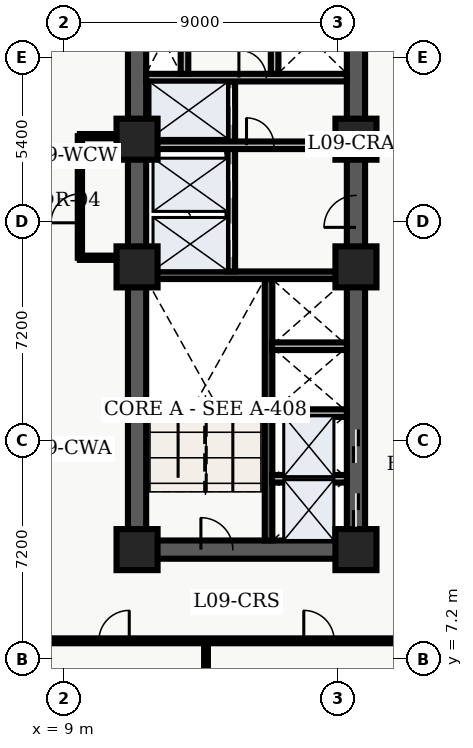
"""IFC4 building model, lengths in metres.
Left out: names, types, materials, properties, quantities, classifications, styles, units other than length and angle.
Written with IfcOpenShell. Run it as: python <this file> out.ifc"""

import sys

from ifc_helpers import new_model, entity, si_unit, converted_unit, direction, frame, origin_with_axes, origin_2d_with_axis, place, context, subcontext, project, spatial, polyline, rectangle, outline, extrude, element, fill, save


model = new_model("IFC4")
c1 = context("Model", 3, precision=1e-05, world=origin_with_axes(), true_north=direction((0.0, 1.0)))
c2 = subcontext(c1, "Body", "Model", "MODEL_VIEW")
j1 = project(units=[si_unit("LENGTHUNIT", "METRE"), converted_unit("PLANEANGLEUNIT", "DEGREE", entity("IfcPlaneAngleMeasure", 0.017), si_unit("PLANEANGLEUNIT", "RADIAN"), dimensions=[0, 0, 0, 0, 0, 0, 0])], contexts=[c1])
p1 = place(None, origin_with_axes())
s1 = spatial("IfcSite", under=j1, at=p1, CompositionType="ELEMENT")
p2 = place(p1, origin_with_axes())
s2 = spatial("IfcBuilding", under=s1, at=p2, CompositionType="ELEMENT")
p3 = place(p2, frame((0.0, 0.0, 40.5), z_axis=(0.0, 0.0, 1.0), x_axis=(1.0, 0.0, 0.0)))
s3 = spatial("IfcBuildingStorey", under=s2, at=p3, CompositionType="ELEMENT", Elevation=40.5)
p4 = place(p3, frame((11.4, 10.8, 0.0), z_axis=(0.0, 0.0, 1.0), x_axis=(0.0, 1.0, 0.0)))
e1 = element("IfcWall", 1, at=p4, inside=s3, PredefinedType="SHEAR", context=c2, shape_type="SweptSolid", body=[
    extrude(outline(polyline([(0.0, -0.3), (27.0, -0.3), (27.0, 0.3), (0.0, 0.3), (0.0, -0.3)])), origin_with_axes(), (0.0, 0.0, 1.0), 3.66),
])
p5 = place(p3, frame((11.4, 10.8, 0.0), z_axis=(0.0, 0.0, 1.0), x_axis=(1.0, 0.0, 0.0)))
e2 = element("IfcWall", 2, at=p5, inside=s3, PredefinedType="SHEAR", context=c2, shape_type="SweptSolid", body=[
    extrude(outline(polyline([(0.0, -0.3), (7.2, -0.3), (7.2, 0.3), (0.0, 0.3), (0.0, -0.3)])), origin_with_axes(), (0.0, 0.0, 1.0), 3.66),
])
p6 = place(p5, frame((2.625, 0.0, 0.0), z_axis=(0.0, 0.0, 1.0), x_axis=(1.0, 0.0, 0.0)))
e3 = element("IfcOpeningElement", 3, at=p6, cuts=e2, PredefinedType="OPENING", context=c2, shape_type="SweptSolid", body=[
    extrude(rectangle(XDim=1.05, YDim=0.62, at=origin_2d_with_axis()), origin_with_axes(), (0.0, 0.0, 1.0), 2.15),
])
p7 = place(p3, frame((18.6, 10.8, 0.0), z_axis=(0.0, 0.0, 1.0), x_axis=(0.0, 1.0, 0.0)))
e4 = element("IfcWall", 4, at=p7, inside=s3, PredefinedType="SHEAR", context=c2, shape_type="SweptSolid", body=[
    extrude(outline(polyline([(0.0, -0.3), (13.5, -0.3), (13.5, 0.3), (0.0, 0.3), (0.0, -0.3)])), origin_with_axes(), (0.0, 0.0, 1.0), 3.66),
])
p8 = place(p7, frame((1.3, 0.0, 0.0), z_axis=(0.0, 0.0, 1.0), x_axis=(1.0, 0.0, 0.0)))
e5 = element("IfcOpeningElement", 5, at=p8, cuts=e4, PredefinedType="OPENING", context=c2, shape_type="SweptSolid", body=[
    extrude(rectangle(XDim=1.1, YDim=0.62, at=origin_2d_with_axis()), origin_with_axes(), (0.0, 0.0, 1.0), 2.15),
])
p9 = place(p7, frame((3.4, 0.0, 0.0), z_axis=(0.0, 0.0, 1.0), x_axis=(1.0, 0.0, 0.0)))
e6 = element("IfcOpeningElement", 6, at=p9, cuts=e4, PredefinedType="OPENING", context=c2, shape_type="SweptSolid", body=[
    extrude(rectangle(XDim=1.1, YDim=0.62, at=origin_2d_with_axis()), origin_with_axes(), (0.0, 0.0, 1.0), 2.15),
])
p10 = place(p7, frame((11.125, 0.0, 0.0), z_axis=(0.0, 0.0, 1.0), x_axis=(1.0, 0.0, 0.0)))
e7 = element("IfcOpeningElement", 7, at=p10, cuts=e4, PredefinedType="OPENING", context=c2, shape_type="SweptSolid", body=[
    extrude(rectangle(XDim=1.05, YDim=0.62, at=origin_2d_with_axis()), origin_with_axes(), (0.0, 0.0, 1.0), 2.15),
])
p11 = place(p3, frame((18.6, 24.3, 0.0), z_axis=(0.0, 0.0, 1.0), x_axis=(0.0, 1.0, 0.0)))
e8 = element("IfcWall", 8, at=p11, inside=s3, PredefinedType="SHEAR", context=c2, shape_type="SweptSolid", body=[
    extrude(outline(polyline([(0.0, -0.3), (13.5, -0.3), (13.5, 0.3), (0.0, 0.3), (0.0, -0.3)])), origin_with_axes(), (0.0, 0.0, 1.0), 3.66),
])
p12 = place(p11, frame((6.725, 0.0, 0.0), z_axis=(0.0, 0.0, 1.0), x_axis=(1.0, 0.0, 0.0)))
e9 = element("IfcOpeningElement", 9, at=p12, cuts=e8, PredefinedType="OPENING", context=c2, shape_type="SweptSolid", body=[
    extrude(rectangle(XDim=1.05, YDim=0.62, at=origin_2d_with_axis()), origin_with_axes(), (0.0, 0.0, 1.0), 2.15),
])
p13 = place(p3, frame((15.725, 11.1, 0.0), z_axis=(0.0, 0.0, 1.0), x_axis=(0.0, 1.0, 0.0)))
e10 = element("IfcWall", 10, at=p13, inside=s3, PredefinedType="SHEAR", context=c2, shape_type="SweptSolid", body=[
    extrude(outline(polyline([(0.0, -0.125), (8.6, -0.125), (8.6, 0.125), (0.0, 0.125), (0.0, -0.125)])), origin_with_axes(), (0.0, 0.0, 1.0), 3.66),
])
p14 = place(p3, frame((11.7, 19.825, 0.0), z_axis=(0.0, 0.0, 1.0), x_axis=(1.0, 0.0, 0.0)))
e11 = element("IfcWall", 11, at=p14, inside=s3, PredefinedType="SHEAR", context=c2, shape_type="SweptSolid", body=[
    extrude(outline(polyline([(0.0, -0.125), (6.6, -0.125), (6.6, 0.125), (0.0, 0.125), (0.0, -0.125)])), origin_with_axes(), (0.0, 0.0, 1.0), 3.66),
])
p15 = place(p3, frame((14.5, 19.95, 0.0), z_axis=(0.0, 0.0, 1.0), x_axis=(0.0, 1.0, 0.0)))
e12 = element("IfcWall", 12, at=p15, inside=s3, PredefinedType="SOLIDWALL", context=c2, shape_type="SweptSolid", body=[
    extrude(outline(polyline([(0.0, -0.125), (6.25, -0.125), (6.25, 0.125), (0.0, 0.125), (0.0, -0.125)])), origin_with_axes(), (0.0, 0.0, 1.0), 2.7),
])
p16 = place(p15, frame((1.025, 0.0, 0.0), z_axis=(0.0, 0.0, 1.0), x_axis=(1.0, 0.0, 0.0)))
e13 = element("IfcOpeningElement", 13, at=p16, cuts=e12, PredefinedType="OPENING", context=c2, shape_type="SweptSolid", body=[
    extrude(rectangle(XDim=1.1, YDim=0.27, at=origin_2d_with_axis()), origin_with_axes(), (0.0, 0.0, 1.0), 2.15),
])
p17 = place(p15, frame((2.975, 0.0, 0.0), z_axis=(0.0, 0.0, 1.0), x_axis=(1.0, 0.0, 0.0)))
e14 = element("IfcOpeningElement", 14, at=p17, cuts=e12, PredefinedType="OPENING", context=c2, shape_type="SweptSolid", body=[
    extrude(rectangle(XDim=1.1, YDim=0.27, at=origin_2d_with_axis()), origin_with_axes(), (0.0, 0.0, 1.0), 2.15),
])
p18 = place(p15, frame((5.425, 0.0, 0.0), z_axis=(0.0, 0.0, 1.0), x_axis=(1.0, 0.0, 0.0)))
e15 = element("IfcOpeningElement", 15, at=p18, cuts=e12, PredefinedType="OPENING", context=c2, shape_type="SweptSolid", body=[
    extrude(rectangle(XDim=1.2, YDim=0.27, at=origin_2d_with_axis()), origin_with_axes(), (0.0, 0.0, 1.0), 2.15),
])
p19 = place(p3, frame((11.7, 24.1, 0.0), z_axis=(0.0, 0.0, 1.0), x_axis=(1.0, 0.0, 0.0)))
e16 = element("IfcWall", 16, at=p19, inside=s3, PredefinedType="SOLIDWALL", context=c2, shape_type="SweptSolid", body=[
    extrude(outline(polyline([(0.0, -0.125), (6.6, -0.125), (6.6, 0.125), (0.0, 0.125), (0.0, -0.125)])), origin_with_axes(), (0.0, 0.0, 1.0), 2.7),
])
p20 = place(p19, frame((3.75, 0.0, 0.0), z_axis=(0.0, 0.0, 1.0), x_axis=(1.0, 0.0, 0.0)))
e17 = element("IfcOpeningElement", 17, at=p20, cuts=e16, PredefinedType="OPENING", context=c2, shape_type="SweptSolid", body=[
    extrude(rectangle(XDim=0.9, YDim=0.27, at=origin_2d_with_axis()), origin_with_axes(), (0.0, 0.0, 1.0), 2.15),
])
p21 = place(p3, frame((11.7, 26.325, 0.0), z_axis=(0.0, 0.0, 1.0), x_axis=(1.0, 0.0, 0.0)))
e18 = element("IfcWall", 18, at=p21, inside=s3, PredefinedType="SOLIDWALL", context=c2, shape_type="SweptSolid", body=[
    extrude(outline(polyline([(0.0, -0.125), (6.6, -0.125), (6.6, 0.125), (0.0, 0.125), (0.0, -0.125)])), origin_with_axes(), (0.0, 0.0, 1.0), 2.7),
])
p22 = place(p21, frame((3.5, 0.0, 0.0), z_axis=(0.0, 0.0, 1.0), x_axis=(1.0, 0.0, 0.0)))
e19 = element("IfcOpeningElement", 19, at=p22, cuts=e18, PredefinedType="OPENING", context=c2, shape_type="SweptSolid", body=[
    extrude(rectangle(XDim=0.9, YDim=0.27, at=origin_2d_with_axis()), origin_with_axes(), (0.0, 0.0, 1.0), 2.15),
])
for number, where, z_axis, x_axis in (
    (20, (12.96, 26.45, 0.0), (0.0, 0.0, 1.0), (0.0, 1.0, 0.0)),
    (21, (15.925, 26.45, 0.0), (0.0, 0.0, 1.0), (0.0, 1.0, 0.0)),
):
    element("IfcWall", number, at=place(p3, frame(where, z_axis=z_axis, x_axis=x_axis)), inside=s3, PredefinedType="SOLIDWALL", context=c2, shape_type="SweptSolid", body=[
        extrude(outline(polyline([(0.0, -0.125), (2.2, -0.125), (2.2, 0.125), (0.0, 0.125), (0.0, -0.125)])), origin_with_axes(), (0.0, 0.0, 1.0), 2.7),
    ])
for number, where, z_axis, x_axis in (
    (22, (11.4, 10.8, 0.0), (0.0, 0.0, 1.0), (1.0, 0.0, 0.0)),
    (23, (11.4, 20.1, 0.0), (0.0, 0.0, 1.0), (1.0, 0.0, 0.0)),
    (24, (11.4, 24.3, 0.0), (0.0, 0.0, 1.0), (1.0, 0.0, 0.0)),
    (25, (18.6, 10.8, 0.0), (0.0, 0.0, 1.0), (1.0, 0.0, 0.0)),
    (26, (18.6, 20.1, 0.0), (0.0, 0.0, 1.0), (1.0, 0.0, 0.0)),
    (27, (18.6, 24.3, 0.0), (0.0, 0.0, 1.0), (1.0, 0.0, 0.0)),
):
    element("IfcColumn", number, at=place(p3, frame(where, z_axis=z_axis, x_axis=x_axis)), inside=s3, PredefinedType="COLUMN", context=c2, shape_type="SweptSolid", body=[
        extrude(rectangle(XDim=1.35, YDim=1.35, at=origin_2d_with_axis()), origin_with_axes(), (0.0, 0.0, 1.0), 3.9),
    ])
for number, where, z_axis, x_axis in (
    (28, (15.84, 13.13, 0.0), (0.0, 0.0, 1.0), (1.0, 0.0, 0.0)),
    (29, (15.84, 15.29, 0.0), (0.0, 0.0, 1.0), (1.0, 0.0, 0.0)),
    (30, (15.84, 17.49, 0.0), (0.0, 0.0, 1.0), (1.0, 0.0, 0.0)),
):
    element("IfcWall", number, at=place(p3, frame(where, z_axis=z_axis, x_axis=x_axis)), inside=s3, PredefinedType="SOLIDWALL", context=c2, shape_type="SweptSolid", body=[
        extrude(outline(polyline([(0.0, -0.125), (2.46, -0.125), (2.46, 0.125), (0.0, 0.125), (0.0, -0.125)])), origin_with_axes(), (0.0, 0.0, 1.0), 2.7),
    ])
p23 = place(p3, frame((9.52, 20.4, 0.0), z_axis=(0.0, 0.0, 1.0), x_axis=(0.0, 1.0, 0.0)))
e31 = element("IfcWall", 31, at=p23, inside=s3, PredefinedType="PARTITIONING", context=c2, shape_type="SweptSolid", body=[
    extrude(outline(polyline([(0.0, -0.07), (4.0, -0.07), (4.0, 0.07), (0.0, 0.07), (0.0, -0.07)])), origin_with_axes(), (0.0, 0.0, 1.0), 2.7),
])
p24 = place(p23, frame((1.625, 0.0, 0.0), z_axis=(0.0, 0.0, 1.0), x_axis=(1.0, 0.0, 0.0)))
e32 = element("IfcOpeningElement", 32, at=p24, cuts=e31, PredefinedType="OPENING", context=c2, shape_type="SweptSolid", body=[
    extrude(rectangle(XDim=0.95, YDim=0.16, at=origin_2d_with_axis()), origin_with_axes(), (0.0, 0.0, 1.0), 2.15),
])
for number, where, z_axis, x_axis in (
    (33, (9.52, 20.4, 0.0), (0.0, 0.0, 1.0), (1.0, 0.0, 0.0)),
    (34, (9.52, 24.4, 0.0), (0.0, 0.0, 1.0), (1.0, 0.0, 0.0)),
):
    element("IfcWall", number, at=place(p3, frame(where, z_axis=z_axis, x_axis=x_axis)), inside=s3, PredefinedType="PARTITIONING", context=c2, shape_type="SweptSolid", body=[
        extrude(outline(polyline([(0.0, -0.07), (1.58, -0.07), (1.58, 0.07), (0.0, 0.07), (0.0, -0.07)])), origin_with_axes(), (0.0, 0.0, 1.0), 2.7),
    ])
p25 = place(p3, frame((2.6, 7.8, 0.0), z_axis=(0.0, 0.0, 1.0), x_axis=(1.0, 0.0, 0.0)))
e35 = element("IfcWall", 35, at=p25, inside=s3, PredefinedType="PARTITIONING", context=c2, shape_type="SweptSolid", body=[
    extrude(outline(polyline([(0.0, -0.08), (18.55, -0.08), (18.55, 0.08), (0.0, 0.08), (0.0, -0.08)])), origin_with_axes(), (0.0, 0.0, 1.0), 2.7),
])
p26 = place(p25, frame((2.225, 0.0, 0.0), z_axis=(0.0, 0.0, 1.0), x_axis=(1.0, 0.0, 0.0)))
e36 = element("IfcOpeningElement", 36, at=p26, cuts=e35, PredefinedType="OPENING", context=c2, shape_type="SweptSolid", body=[
    extrude(rectangle(XDim=1.0, YDim=0.18, at=origin_2d_with_axis()), origin_with_axes(), (0.0, 0.0, 1.0), 2.15),
])
p27 = place(p25, frame((8.043, 0.0, 0.0), z_axis=(0.0, 0.0, 1.0), x_axis=(1.0, 0.0, 0.0)))
e37 = element("IfcOpeningElement", 37, at=p27, cuts=e35, PredefinedType="OPENING", context=c2, shape_type="SweptSolid", body=[
    extrude(rectangle(XDim=1.0, YDim=0.18, at=origin_2d_with_axis()), origin_with_axes(), (0.0, 0.0, 1.0), 2.15),
])
p28 = place(p25, frame((14.784, 0.0, 0.0), z_axis=(0.0, 0.0, 1.0), x_axis=(1.0, 0.0, 0.0)))
e38 = element("IfcOpeningElement", 38, at=p28, cuts=e35, PredefinedType="OPENING", context=c2, shape_type="SweptSolid", body=[
    extrude(rectangle(XDim=1.0, YDim=0.18, at=origin_2d_with_axis()), origin_with_axes(), (0.0, 0.0, 1.0), 2.15),
])
p29 = place(p3, frame((13.668, 0.36, 0.0), z_axis=(0.0, 0.0, 1.0), x_axis=(0.0, 1.0, 0.0)))
e39 = element("IfcWall", 39, at=p29, inside=s3, PredefinedType="PARTITIONING", context=c2, shape_type="SweptSolid", body=[
    extrude(outline(polyline([(0.0, -0.062), (7.34, -0.062), (7.34, 0.062), (0.0, 0.062), (0.0, -0.062)])), origin_with_axes(), (0.0, 0.0, 1.0), 2.7),
])
p30 = place(p7, frame((1.3, 0.0, 0.0), z_axis=(0.0, 0.0, 1.0), x_axis=(1.0, 0.0, 0.0)))
e40 = element("IfcDoor", 40, at=p30, inside=s3, OperationType="SLIDING_TO_LEFT", PredefinedType="DOOR", context=c2, shape_type="SweptSolid", body=[
    extrude(rectangle(XDim=1.1, YDim=0.09, at=origin_2d_with_axis()), origin_with_axes(), (0.0, 0.0, 1.0), 2.15),
])
fill(e5, e40)
p31 = place(p7, frame((3.4, 0.0, 0.0), z_axis=(0.0, 0.0, 1.0), x_axis=(1.0, 0.0, 0.0)))
e41 = element("IfcDoor", 41, at=p31, inside=s3, OperationType="SLIDING_TO_RIGHT", PredefinedType="DOOR", context=c2, shape_type="SweptSolid", body=[
    extrude(rectangle(XDim=1.1, YDim=0.09, at=origin_2d_with_axis()), origin_with_axes(), (0.0, 0.0, 1.0), 2.15),
])
fill(e6, e41)
p32 = place(p15, frame((1.025, 0.0, 0.0), z_axis=(0.0, 0.0, 1.0), x_axis=(1.0, 0.0, 0.0)))
e42 = element("IfcDoor", 42, at=p32, inside=s3, OperationType="SLIDING_TO_LEFT", PredefinedType="DOOR", context=c2, shape_type="SweptSolid", body=[
    extrude(rectangle(XDim=1.1, YDim=0.09, at=origin_2d_with_axis()), origin_with_axes(), (0.0, 0.0, 1.0), 2.15),
])
fill(e13, e42)
p33 = place(p15, frame((2.975, 0.0, 0.0), z_axis=(0.0, 0.0, 1.0), x_axis=(1.0, 0.0, 0.0)))
e43 = element("IfcDoor", 43, at=p33, inside=s3, OperationType="SLIDING_TO_RIGHT", PredefinedType="DOOR", context=c2, shape_type="SweptSolid", body=[
    extrude(rectangle(XDim=1.1, YDim=0.09, at=origin_2d_with_axis()), origin_with_axes(), (0.0, 0.0, 1.0), 2.15),
])
fill(e14, e43)
p34 = place(p15, frame((5.425, 0.0, 0.0), z_axis=(0.0, 0.0, 1.0), x_axis=(1.0, 0.0, 0.0)))
e44 = element("IfcDoor", 44, at=p34, inside=s3, OperationType="DOUBLE_DOOR_SLIDING", PredefinedType="DOOR", context=c2, shape_type="SweptSolid", body=[
    extrude(rectangle(XDim=1.2, YDim=0.09, at=origin_2d_with_axis()), origin_with_axes(), (0.0, 0.0, 1.0), 2.15),
])
fill(e15, e44)
p35 = place(p5, frame((2.625, 0.0, 0.0), z_axis=(0.0, 0.0, 1.0), x_axis=(1.0, 0.0, 0.0)))
e45 = element("IfcDoor", 45, at=p35, inside=s3, OperationType="SINGLE_SWING_LEFT", PredefinedType="DOOR", context=c2, shape_type="SweptSolid", body=[
    extrude(rectangle(XDim=1.05, YDim=0.09, at=origin_2d_with_axis()), origin_with_axes(), (0.0, 0.0, 1.0), 2.15),
])
fill(e3, e45)
p36 = place(p7, frame((11.125, 0.0, 0.0), z_axis=(0.0, 0.0, 1.0), x_axis=(1.0, 0.0, 0.0)))
e46 = element("IfcDoor", 46, at=p36, inside=s3, OperationType="SINGLE_SWING_LEFT", PredefinedType="DOOR", context=c2, shape_type="SweptSolid", body=[
    extrude(rectangle(XDim=1.05, YDim=0.09, at=origin_2d_with_axis()), origin_with_axes(), (0.0, 0.0, 1.0), 2.15),
])
fill(e7, e46)
p37 = place(p19, frame((3.75, 0.0, 0.0), z_axis=(0.0, 0.0, 1.0), x_axis=(1.0, 0.0, 0.0)))
e47 = element("IfcDoor", 47, at=p37, inside=s3, OperationType="SINGLE_SWING_LEFT", PredefinedType="DOOR", context=c2, shape_type="SweptSolid", body=[
    extrude(rectangle(XDim=0.9, YDim=0.09, at=origin_2d_with_axis()), origin_with_axes(), (0.0, 0.0, 1.0), 2.15),
])
fill(e17, e47)
p38 = place(p21, frame((3.5, 0.0, 0.0), z_axis=(0.0, 0.0, 1.0), x_axis=(1.0, 0.0, 0.0)))
e48 = element("IfcDoor", 48, at=p38, inside=s3, OperationType="SINGLE_SWING_LEFT", PredefinedType="DOOR", context=c2, shape_type="SweptSolid", body=[
    extrude(rectangle(XDim=0.9, YDim=0.09, at=origin_2d_with_axis()), origin_with_axes(), (0.0, 0.0, 1.0), 2.15),
])
fill(e19, e48)
p39 = place(p23, frame((1.625, 0.0, 0.0), z_axis=(0.0, 0.0, 1.0), x_axis=(1.0, 0.0, 0.0)))
e49 = element("IfcDoor", 49, at=p39, inside=s3, OperationType="SINGLE_SWING_LEFT", PredefinedType="DOOR", context=c2, shape_type="SweptSolid", body=[
    extrude(rectangle(XDim=0.95, YDim=0.084, at=origin_2d_with_axis()), origin_with_axes(), (0.0, 0.0, 1.0), 2.15),
])
fill(e32, e49)
p40 = place(p25, frame((8.043, 0.0, 0.0), z_axis=(0.0, 0.0, 1.0), x_axis=(1.0, 0.0, 0.0)))
e50 = element("IfcDoor", 50, at=p40, inside=s3, OperationType="SINGLE_SWING_RIGHT", PredefinedType="DOOR", context=c2, shape_type="SweptSolid", body=[
    extrude(rectangle(XDim=1.0, YDim=0.09, at=origin_2d_with_axis()), origin_with_axes(), (0.0, 0.0, 1.0), 2.15),
])
fill(e37, e50)
p41 = place(p25, frame((14.784, 0.0, 0.0), z_axis=(0.0, 0.0, 1.0), x_axis=(1.0, 0.0, 0.0)))
e51 = element("IfcDoor", 51, at=p41, inside=s3, OperationType="SINGLE_SWING_LEFT", PredefinedType="DOOR", context=c2, shape_type="SweptSolid", body=[
    extrude(rectangle(XDim=1.0, YDim=0.09, at=origin_2d_with_axis()), origin_with_axes(), (0.0, 0.0, 1.0), 2.15),
])
fill(e38, e51)
save(model, sys.argv[1])
